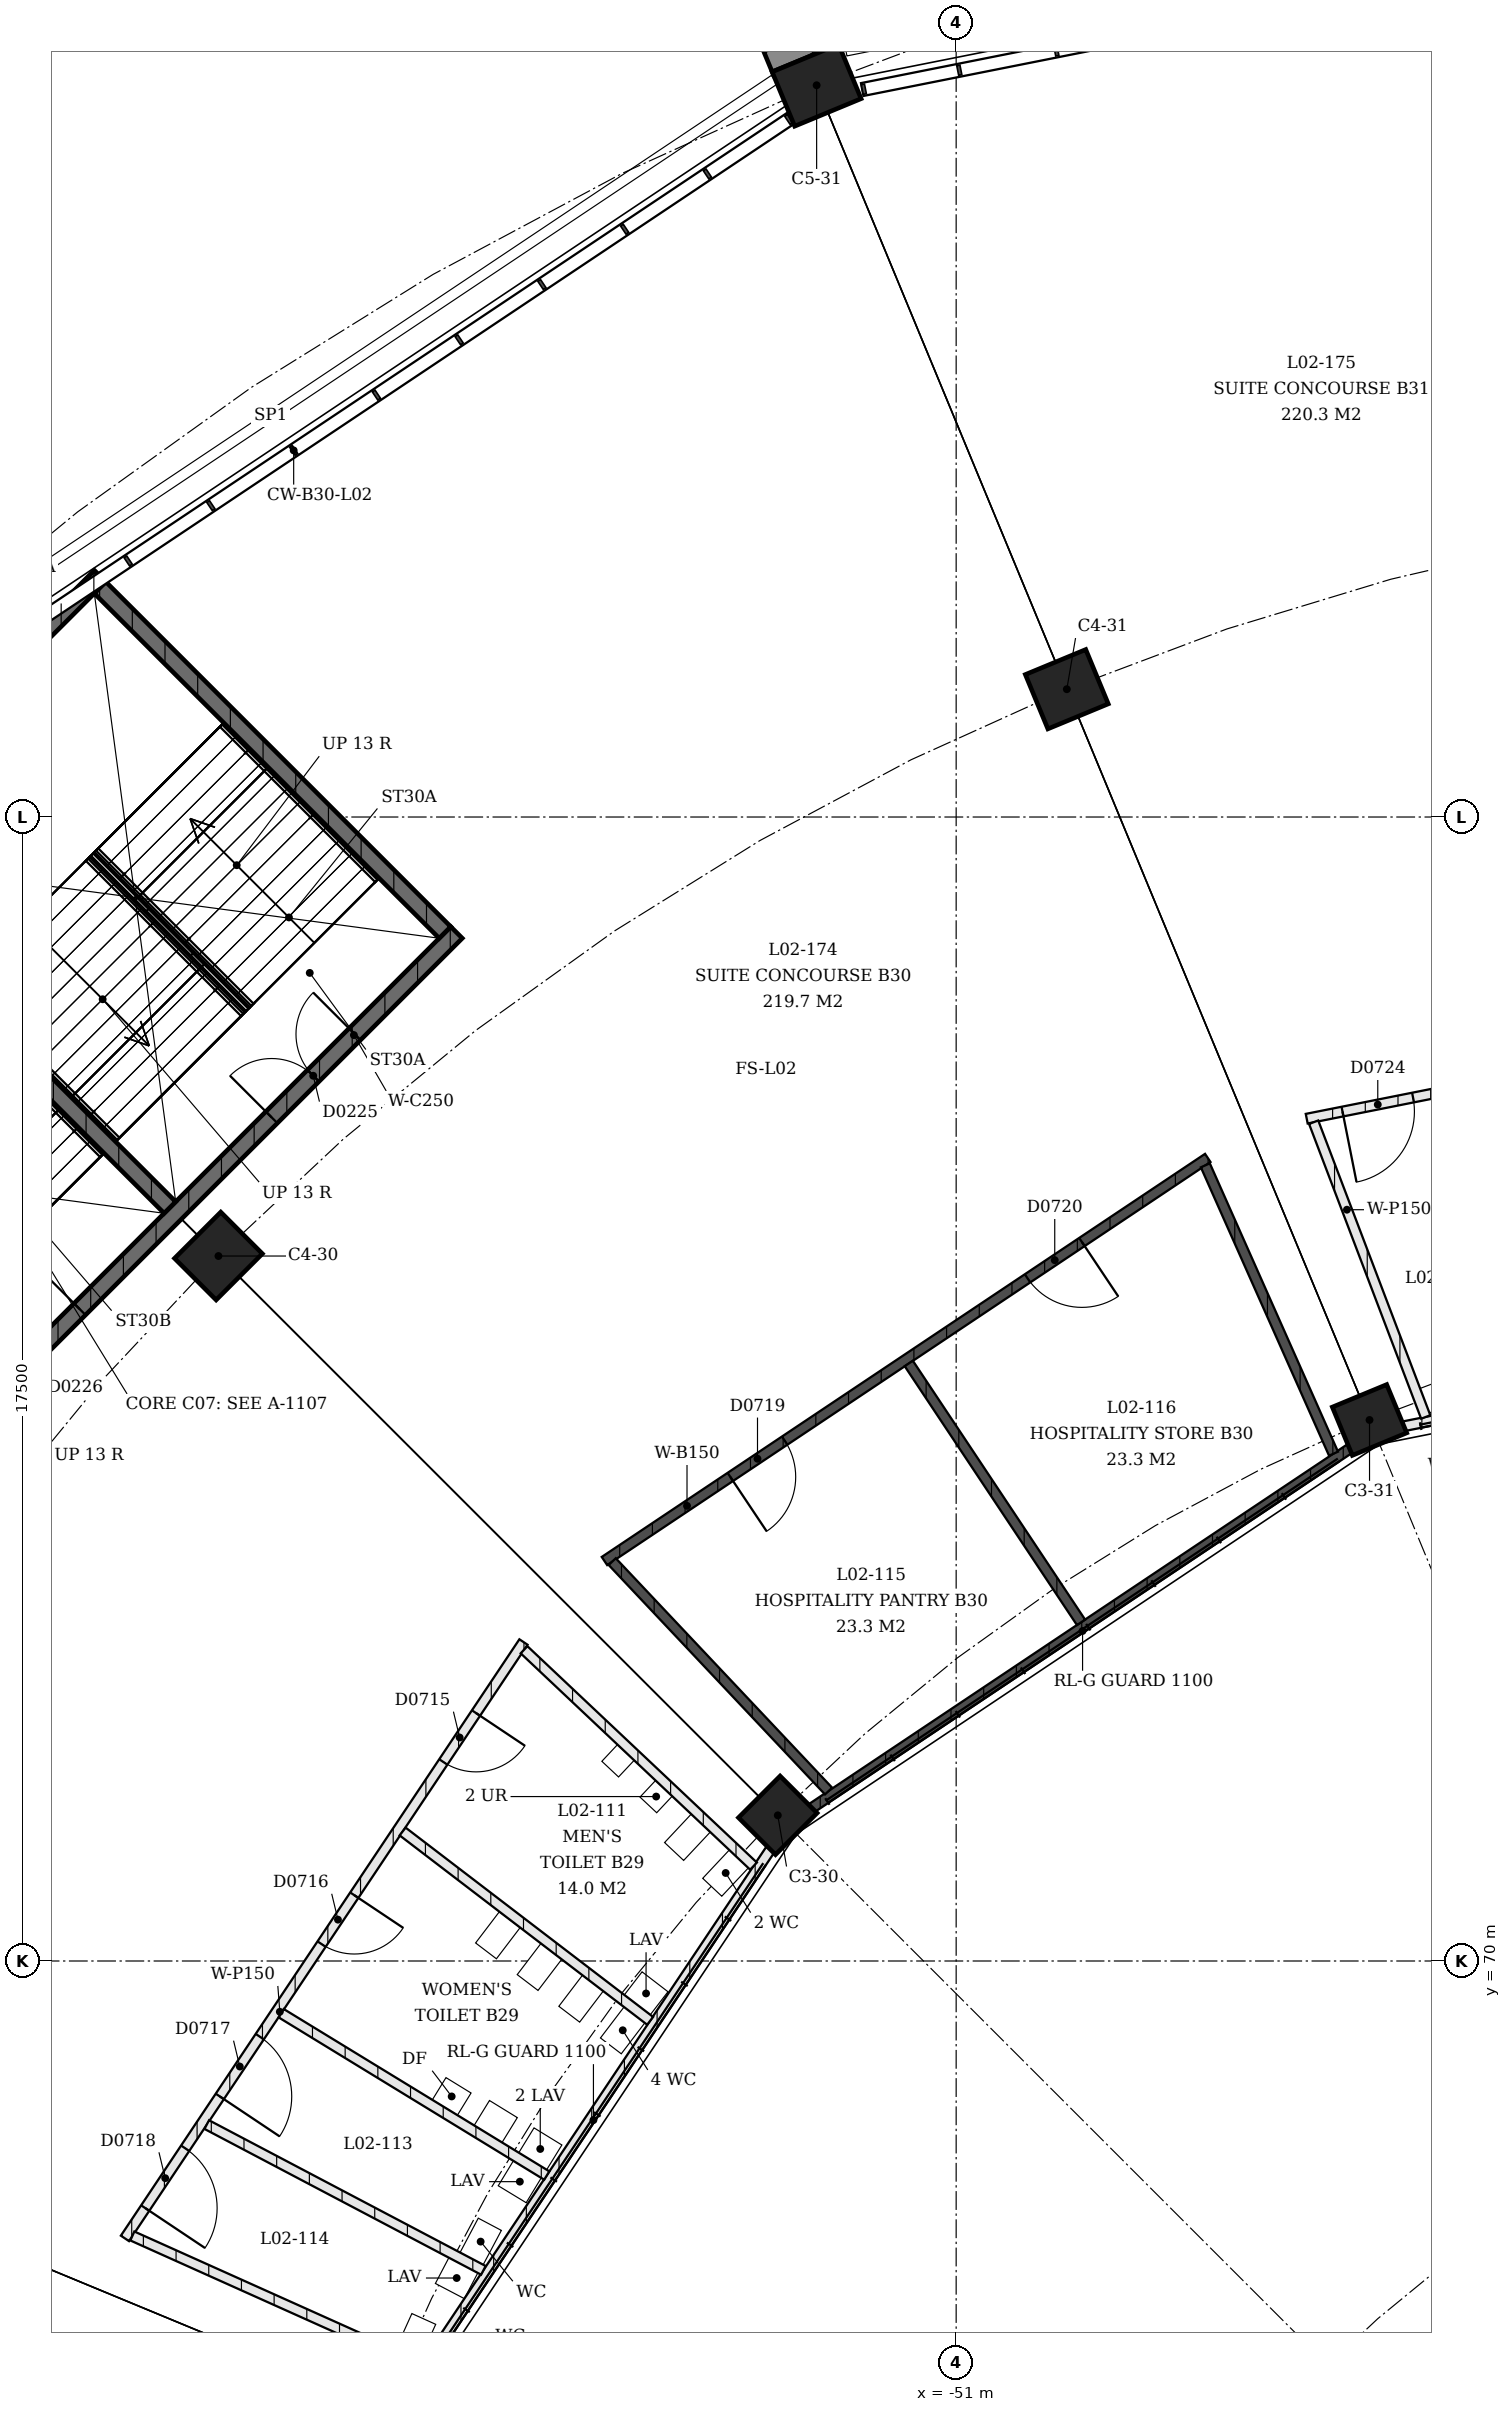
"""IFC4 building model, lengths in metres.
Left out: names, types, materials, properties, quantities, classifications, styles, units other than length and angle.
Written with IfcOpenShell. Run it as: python <this file> out.ifc"""

import sys

from ifc_helpers import new_model, si_unit, direction, frame, frame_2d, origin, origin_2d, place, context, subcontext, project, spatial, rectangle, extrude, element, fill, save


model = new_model("IFC4")
c1 = context("Model", 3, precision=1e-05, world=origin(), true_north=direction((0.0, 1.0)))
c2 = subcontext(c1, "Body", "Model", "MODEL_VIEW")
j1 = project(units=[si_unit("LENGTHUNIT", "METRE"), si_unit("PLANEANGLEUNIT", "RADIAN")], contexts=[c1])
p1 = place(None, origin())
s1 = spatial("IfcSite", under=j1, at=p1, CompositionType="ELEMENT")
p2 = place(p1, origin())
s2 = spatial("IfcBuilding", under=s1, at=p2, CompositionType="ELEMENT")
p3 = place(p2, frame((0.0, 0.0, 9.0)))
s3 = spatial("IfcBuildingStorey", under=s2, at=p3, CompositionType="ELEMENT", Elevation=9.0)
p4 = place(p3, frame((-53.728, 72.228, 0.0), z_axis=(0.0, 0.0, 1.0), x_axis=(-0.707106781187, -0.707106781187, 0.0)))
e1 = element("IfcColumn", 1, at=p4, inside=s3, PredefinedType="COLUMN", context=c2, shape_type="SweptSolid", body=[
    extrude(rectangle(XDim=0.9, YDim=0.8, at=origin_2d()), origin(), (0.0, 0.0, 1.0), 4.5),
])
p5 = place(p3, frame((-62.284, 80.784, 0.0), z_axis=(0.0, 0.0, 1.0), x_axis=(-0.707106781187, -0.707106781187, 0.0)))
e2 = element("IfcColumn", 2, at=p5, inside=s3, PredefinedType="COLUMN", context=c2, shape_type="SweptSolid", body=[
    extrude(rectangle(XDim=1.0, YDim=0.9, at=origin_2d()), origin(), (0.0, 0.0, 1.0), 4.5),
])
p6 = place(p3, frame((-44.677, 78.276, 0.0), z_axis=(0.0, 0.0, 1.0), x_axis=(-0.923879532511, -0.382683432365, 0.0)))
e3 = element("IfcColumn", 3, at=p6, inside=s3, PredefinedType="COLUMN", context=c2, shape_type="SweptSolid", body=[
    extrude(rectangle(XDim=0.9, YDim=0.8, at=origin_2d()), origin(), (0.0, 0.0, 1.0), 4.5),
])
p7 = place(p3, frame((-49.307, 89.455, 0.0), z_axis=(0.0, 0.0, 1.0), x_axis=(-0.923879532511, -0.382683432365, 0.0)))
e4 = element("IfcColumn", 4, at=p7, inside=s3, PredefinedType="COLUMN", context=c2, shape_type="SweptSolid", body=[
    extrude(rectangle(XDim=1.0, YDim=0.9, at=origin_2d()), origin(), (0.0, 0.0, 1.0), 4.5),
])
p8 = place(p3, frame((-53.134, 98.694, 0.0), z_axis=(0.0, 0.0, 1.0), x_axis=(-0.923879532511, -0.382683432365, 0.0)))
e5 = element("IfcColumn", 5, at=p8, inside=s3, PredefinedType="COLUMN", context=c2, shape_type="SweptSolid", body=[
    extrude(rectangle(XDim=1.1, YDim=0.9, at=origin_2d()), origin(), (0.0, 0.0, 1.0), 4.5),
])
p9 = place(p3, frame((-58.643, 85.734, 0.0), z_axis=(0.0, 0.0, 1.0), x_axis=(-0.707106781187, -0.707106781187, 0.0)))
e6 = element("IfcWall", 6, at=p9, inside=s3, PredefinedType="SHEAR", context=c2, shape_type="SweptSolid", body=[
    extrude(rectangle(XDim=12.15, YDim=0.25, at=frame_2d((6.075, 0.0))), origin(), (0.0, 0.0, 1.0), 4.09),
])
p10 = place(p9, frame((2.2, 0.0, 0.0)))
e7 = element("IfcOpeningElement", 7, at=p10, cuts=e6, PredefinedType="OPENING", context=c2, shape_type="SweptSolid", body=[
    extrude(rectangle(XDim=1.8, YDim=2.1, at=frame_2d((0.9, 1.05))), frame((0.0, 0.125, 0.0), z_axis=(0.0, -1.0, 0.0), x_axis=(1.0, 0.0, 0.0)), (0.0, 0.0, 1.0), 0.25),
])
p11 = place(p9, frame((8.15, 0.0, 0.0)))
e8 = element("IfcOpeningElement", 8, at=p11, cuts=e6, PredefinedType="OPENING", context=c2, shape_type="SweptSolid", body=[
    extrude(rectangle(XDim=1.8, YDim=2.1, at=frame_2d((0.9, 1.05))), frame((0.0, 0.125, 0.0), z_axis=(0.0, -1.0, 0.0), x_axis=(1.0, 0.0, 0.0)), (0.0, 0.0, 1.0), 0.25),
])
p12 = place(p3, frame((-64.094, 91.186, 0.0), z_axis=(0.0, 0.0, 1.0), x_axis=(-0.707106781187, -0.707106781187, 0.0)))
e9 = element("IfcWall", 9, at=p12, inside=s3, PredefinedType="SHEAR", context=c2, shape_type="SweptSolid", body=[
    extrude(rectangle(XDim=12.15, YDim=0.25, at=frame_2d((6.075, 0.0))), origin(), (0.0, 0.0, 1.0), 4.09),
])
p13 = place(p3, frame((-58.819, 85.734, 0.0), z_axis=(0.0, 0.0, 1.0), x_axis=(-0.707123144286, 0.707090417709, 0.0)))
e10 = element("IfcWall", 10, at=p13, inside=s3, PredefinedType="SHEAR", context=c2, shape_type="SweptSolid", body=[
    extrude(rectangle(XDim=7.46, YDim=0.25, at=frame_2d((3.73, 0.0))), origin(), (0.0, 0.0, 1.0), 4.09),
])
p14 = place(p3, frame((-63.027, 81.527, 0.0), z_axis=(0.0, 0.0, 1.0), x_axis=(-0.707106781187, 0.707106781187, 0.0)))
e11 = element("IfcWall", 11, at=p14, inside=s3, PredefinedType="SHEAR", context=c2, shape_type="SweptSolid", body=[
    extrude(rectangle(XDim=7.46, YDim=0.25, at=frame_2d((3.73, 0.0))), origin(), (0.0, 0.0, 1.0), 4.09),
])
p15 = place(p3, frame((-53.842, 71.705, 0.0), z_axis=(0.0, 0.0, 1.0), x_axis=(-0.555582843463, -0.831461186136, 0.0)))
e12 = element("IfcWall", 12, at=p15, inside=s3, PredefinedType="PARTITIONING", context=c2, shape_type="SweptSolid", body=[
    extrude(rectangle(XDim=9.89, YDim=0.15, at=frame_2d((4.945, 0.0))), origin(), (0.0, 0.0, 1.0), 3.0),
])
p16 = place(p3, frame((-57.619, 74.88, 0.0), z_axis=(0.0, 0.0, 1.0), x_axis=(-0.555577934543, -0.831464466258, 0.0)))
e13 = element("IfcWall", 13, at=p16, inside=s3, PredefinedType="PARTITIONING", context=c2, shape_type="SweptSolid", body=[
    extrude(rectangle(XDim=10.972, YDim=0.15, at=frame_2d((5.486, 0.0))), origin(), (0.0, 0.0, 1.0), 3.0),
])
p17 = place(p16, frame((1.307, 0.0, 0.0)))
e14 = element("IfcOpeningElement", 14, at=p17, cuts=e13, PredefinedType="OPENING", context=c2, shape_type="SweptSolid", body=[
    extrude(rectangle(XDim=0.9, YDim=2.1, at=frame_2d((0.45, 1.05))), frame((0.0, 0.075, 0.0), z_axis=(0.0, -1.0, 0.0), x_axis=(1.0, 0.0, 0.0)), (0.0, 0.0, 1.0), 0.15),
])
p18 = place(p16, frame((4.658, 0.0, 0.0)))
e15 = element("IfcOpeningElement", 15, at=p18, cuts=e13, PredefinedType="OPENING", context=c2, shape_type="SweptSolid", body=[
    extrude(rectangle(XDim=0.9, YDim=2.1, at=frame_2d((0.45, 1.05))), frame((0.0, 0.075, 0.0), z_axis=(0.0, -1.0, 0.0), x_axis=(1.0, 0.0, 0.0)), (0.0, 0.0, 1.0), 0.15),
])
p19 = place(p16, frame((7.26, 0.0, 0.0)))
e16 = element("IfcOpeningElement", 16, at=p19, cuts=e13, PredefinedType="OPENING", context=c2, shape_type="SweptSolid", body=[
    extrude(rectangle(XDim=1.1, YDim=2.1, at=frame_2d((0.55, 1.05))), frame((0.0, 0.075, 0.0), z_axis=(0.0, -1.0, 0.0), x_axis=(1.0, 0.0, 0.0)), (0.0, 0.0, 1.0), 0.15),
])
p20 = place(p16, frame((9.314, 0.0, 0.0)))
e17 = element("IfcOpeningElement", 17, at=p20, cuts=e13, PredefinedType="OPENING", context=c2, shape_type="SweptSolid", body=[
    extrude(rectangle(XDim=1.1, YDim=2.1, at=frame_2d((0.55, 1.05))), frame((0.0, 0.075, 0.0), z_axis=(0.0, -1.0, 0.0), x_axis=(1.0, 0.0, 0.0)), (0.0, 0.0, 1.0), 0.15),
])
p21 = place(p3, frame((-54.1, 71.452, 0.0), z_axis=(0.0, 0.0, 1.0), x_axis=(-0.727577136184, 0.686025882093, 0.0)))
e18 = element("IfcWall", 18, at=p21, inside=s3, PredefinedType="PARTITIONING", context=c2, shape_type="SweptSolid", body=[
    extrude(rectangle(XDim=4.824, YDim=0.15, at=frame_2d((2.412, 0.0))), origin(), (0.0, 0.0, 1.0), 3.0),
])
p22 = place(p3, frame((-55.681, 69.085, 0.0), z_axis=(0.0, 0.0, 1.0), x_axis=(-0.794266232117, 0.607569874597, 0.0)))
e19 = element("IfcWall", 19, at=p22, inside=s3, PredefinedType="PARTITIONING", context=c2, shape_type="SweptSolid", body=[
    extrude(rectangle(XDim=4.767, YDim=0.15, at=frame_2d((2.383, 0.0))), origin(), (0.0, 0.0, 1.0), 3.0),
])
p23 = place(p3, frame((-57.262, 66.718, 0.0), z_axis=(0.0, 0.0, 1.0), x_axis=(-0.8532285882, 0.52153712838, 0.0)))
e20 = element("IfcWall", 20, at=p23, inside=s3, PredefinedType="PARTITIONING", context=c2, shape_type="SweptSolid", body=[
    extrude(rectangle(XDim=4.761, YDim=0.15, at=frame_2d((2.38, 0.0))), origin(), (0.0, 0.0, 1.0), 3.0),
])
p24 = place(p3, frame((-58.232, 65.268, 0.0), z_axis=(0.0, 0.0, 1.0), x_axis=(-0.884698876091, 0.466162952886, 0.0)))
e21 = element("IfcWall", 21, at=p24, inside=s3, PredefinedType="PARTITIONING", context=c2, shape_type="SweptSolid", body=[
    extrude(rectangle(XDim=4.783, YDim=0.15, at=frame_2d((2.391, 0.0))), origin(), (0.0, 0.0, 1.0), 3.0),
])
p25 = place(p3, frame((-59.201, 63.817, 0.0), z_axis=(0.0, 0.0, 1.0), x_axis=(-0.912239426779, 0.409657452305, 0.0)))
e22 = element("IfcWall", 22, at=p25, inside=s3, PredefinedType="PARTITIONING", context=c2, shape_type="SweptSolid", body=[
    extrude(rectangle(XDim=4.824, YDim=0.15, at=frame_2d((2.412, 0.0))), origin(), (0.0, 0.0, 1.0), 3.0),
])
p26 = place(p3, frame((-53.205, 72.342, 0.0), z_axis=(0.0, 0.0, 1.0), x_axis=(0.831461186136, 0.555582843463, 0.0)))
e23 = element("IfcWall", 23, at=p26, inside=s3, PredefinedType="SOLIDWALL", context=c2, shape_type="SweptSolid", body=[
    extrude(rectangle(XDim=9.89, YDim=0.15, at=frame_2d((4.945, 0.0))), origin(), (0.0, 0.0, 1.0), 3.0),
])
p27 = place(p3, frame((-56.38, 76.119, 0.0), z_axis=(0.0, 0.0, 1.0), x_axis=(0.831471162003, 0.555567913722, 0.0)))
e24 = element("IfcWall", 24, at=p27, inside=s3, PredefinedType="SOLIDWALL", context=c2, shape_type="SweptSolid", body=[
    extrude(rectangle(XDim=11.099, YDim=0.15, at=frame_2d((5.55, 0.0))), origin(), (0.0, 0.0, 1.0), 3.0),
])
p28 = place(p27, frame((2.315, 0.0, 0.0)))
e25 = element("IfcOpeningElement", 25, at=p28, cuts=e24, PredefinedType="OPENING", context=c2, shape_type="SweptSolid", body=[
    extrude(rectangle(XDim=1.0, YDim=2.1, at=frame_2d((0.5, 1.05))), frame((0.0, 0.075, 0.0), z_axis=(0.0, -1.0, 0.0), x_axis=(1.0, 0.0, 0.0)), (0.0, 0.0, 1.0), 0.15),
])
p29 = place(p27, frame((7.784, 0.0, 0.0)))
e26 = element("IfcOpeningElement", 26, at=p29, cuts=e24, PredefinedType="OPENING", context=c2, shape_type="SweptSolid", body=[
    extrude(rectangle(XDim=1.0, YDim=2.1, at=frame_2d((0.5, 1.05))), frame((0.0, 0.075, 0.0), z_axis=(0.0, -1.0, 0.0), x_axis=(1.0, 0.0, 0.0)), (0.0, 0.0, 1.0), 0.15),
])
p30 = place(p3, frame((-52.952, 72.6, 0.0), z_axis=(0.0, 0.0, 1.0), x_axis=(-0.686025882093, 0.727577136184, 0.0)))
e27 = element("IfcWall", 27, at=p30, inside=s3, PredefinedType="SOLIDWALL", context=c2, shape_type="SweptSolid", body=[
    extrude(rectangle(XDim=4.824, YDim=0.15, at=frame_2d((2.412, 0.0))), origin(), (0.0, 0.0, 1.0), 3.0),
])
p31 = place(p3, frame((-49.09, 75.18, 0.0), z_axis=(0.0, 0.0, 1.0), x_axis=(-0.553930112441, 0.832563169093, 0.0)))
e28 = element("IfcWall", 28, at=p31, inside=s3, PredefinedType="SOLIDWALL", context=c2, shape_type="SweptSolid", body=[
    extrude(rectangle(XDim=4.757, YDim=0.15, at=frame_2d((2.378, 0.0))), origin(), (0.0, 0.0, 1.0), 3.0),
])
p32 = place(p3, frame((-45.228, 77.761, 0.0), z_axis=(0.0, 0.0, 1.0), x_axis=(-0.406147851791, 0.913807377124, 0.0)))
e29 = element("IfcWall", 29, at=p32, inside=s3, PredefinedType="SOLIDWALL", context=c2, shape_type="SweptSolid", body=[
    extrude(rectangle(XDim=4.827, YDim=0.15, at=frame_2d((2.414, 0.0))), origin(), (0.0, 0.0, 1.0), 3.0),
])
p33 = place(p3, frame((-34.5, 80.101, 0.0), z_axis=(0.0, 0.0, 1.0), x_axis=(-0.980783419557, -0.195099676887, 0.0)))
e30 = element("IfcWall", 30, at=p33, inside=s3, PredefinedType="PARTITIONING", context=c2, shape_type="SweptSolid", body=[
    extrude(rectangle(XDim=9.839, YDim=0.15, at=frame_2d((4.92, 0.0))), origin(), (0.0, 0.0, 1.0), 3.0),
])
p34 = place(p3, frame((-34.876, 85.026, 0.0), z_axis=(0.0, 0.0, 1.0), x_axis=(-0.980788934186, -0.195071952313, 0.0)))
e31 = element("IfcWall", 31, at=p34, inside=s3, PredefinedType="PARTITIONING", context=c2, shape_type="SweptSolid", body=[
    extrude(rectangle(XDim=10.972, YDim=0.15, at=frame_2d((5.486, 0.0))), origin(), (0.0, 0.0, 1.0), 3.0),
])
p35 = place(p34, frame((1.307, 0.0, 0.0)))
e32 = element("IfcOpeningElement", 32, at=p35, cuts=e31, PredefinedType="OPENING", context=c2, shape_type="SweptSolid", body=[
    extrude(rectangle(XDim=0.9, YDim=2.1, at=frame_2d((0.45, 1.05))), frame((0.0, 0.075, 0.0), z_axis=(0.0, -1.0, 0.0), x_axis=(1.0, 0.0, 0.0)), (0.0, 0.0, 1.0), 0.15),
])
p36 = place(p34, frame((4.658, 0.0, 0.0)))
e33 = element("IfcOpeningElement", 33, at=p36, cuts=e31, PredefinedType="OPENING", context=c2, shape_type="SweptSolid", body=[
    extrude(rectangle(XDim=0.9, YDim=2.1, at=frame_2d((0.45, 1.05))), frame((0.0, 0.075, 0.0), z_axis=(0.0, -1.0, 0.0), x_axis=(1.0, 0.0, 0.0)), (0.0, 0.0, 1.0), 0.15),
])
p37 = place(p34, frame((7.26, 0.0, 0.0)))
e34 = element("IfcOpeningElement", 34, at=p37, cuts=e31, PredefinedType="OPENING", context=c2, shape_type="SweptSolid", body=[
    extrude(rectangle(XDim=1.1, YDim=2.1, at=frame_2d((0.55, 1.05))), frame((0.0, 0.075, 0.0), z_axis=(0.0, -1.0, 0.0), x_axis=(1.0, 0.0, 0.0)), (0.0, 0.0, 1.0), 0.15),
])
p38 = place(p34, frame((9.314, 0.0, 0.0)))
e35 = element("IfcOpeningElement", 35, at=p38, cuts=e31, PredefinedType="OPENING", context=c2, shape_type="SweptSolid", body=[
    extrude(rectangle(XDim=1.1, YDim=2.1, at=frame_2d((0.55, 1.05))), frame((0.0, 0.075, 0.0), z_axis=(0.0, -1.0, 0.0), x_axis=(1.0, 0.0, 0.0)), (0.0, 0.0, 1.0), 0.15),
])
p39 = place(p3, frame((-43.817, 78.322, 0.0), z_axis=(0.0, 0.0, 1.0), x_axis=(-0.35538492255, 0.934720041951, 0.0)))
e36 = element("IfcWall", 36, at=p39, inside=s3, PredefinedType="PARTITIONING", context=c2, shape_type="SweptSolid", body=[
    extrude(rectangle(XDim=4.824, YDim=0.15, at=frame_2d((2.412, 0.0))), origin(), (0.0, 0.0, 1.0), 3.0),
])
p40 = place(p10, origin())
e37 = element("IfcDoor", 37, at=p40, inside=s3, OperationType="DOUBLE_DOOR_SINGLE_SWING", PredefinedType="DOOR", context=c2, shape_type="SweptSolid", body=[
    extrude(rectangle(XDim=1.8, YDim=2.1, at=frame_2d((0.9, 1.05))), frame((0.0, 0.025, 0.0), z_axis=(0.0, -1.0, 0.0), x_axis=(1.0, 0.0, 0.0)), (0.0, 0.0, 1.0), 0.05),
])
fill(e7, e37)
p41 = place(p11, origin())
e38 = element("IfcDoor", 38, at=p41, inside=s3, OperationType="DOUBLE_DOOR_SINGLE_SWING", PredefinedType="DOOR", context=c2, shape_type="SweptSolid", body=[
    extrude(rectangle(XDim=1.8, YDim=2.1, at=frame_2d((0.9, 1.05))), frame((0.0, 0.025, 0.0), z_axis=(0.0, -1.0, 0.0), x_axis=(1.0, 0.0, 0.0)), (0.0, 0.0, 1.0), 0.05),
])
fill(e8, e38)
p42 = place(p17, origin())
e39 = element("IfcDoor", 39, at=p42, inside=s3, OperationType="SINGLE_SWING_RIGHT", PredefinedType="DOOR", context=c2, shape_type="SweptSolid", body=[
    extrude(rectangle(XDim=0.9, YDim=2.1, at=frame_2d((0.45, 1.05))), frame((0.0, 0.025, 0.0), z_axis=(0.0, -1.0, 0.0), x_axis=(1.0, 0.0, 0.0)), (0.0, 0.0, 1.0), 0.05),
])
fill(e14, e39)
p43 = place(p18, origin())
e40 = element("IfcDoor", 40, at=p43, inside=s3, OperationType="SINGLE_SWING_RIGHT", PredefinedType="DOOR", context=c2, shape_type="SweptSolid", body=[
    extrude(rectangle(XDim=0.9, YDim=2.1, at=frame_2d((0.45, 1.05))), frame((0.0, 0.025, 0.0), z_axis=(0.0, -1.0, 0.0), x_axis=(1.0, 0.0, 0.0)), (0.0, 0.0, 1.0), 0.05),
])
fill(e15, e40)
p44 = place(p19, origin())
e41 = element("IfcDoor", 41, at=p44, inside=s3, OperationType="SINGLE_SWING_LEFT", PredefinedType="DOOR", context=c2, shape_type="SweptSolid", body=[
    extrude(rectangle(XDim=1.1, YDim=2.1, at=frame_2d((0.55, 1.05))), frame((0.0, 0.025, 0.0), z_axis=(0.0, -1.0, 0.0), x_axis=(1.0, 0.0, 0.0)), (0.0, 0.0, 1.0), 0.05),
])
fill(e16, e41)
p45 = place(p20, origin())
e42 = element("IfcDoor", 42, at=p45, inside=s3, OperationType="SINGLE_SWING_LEFT", PredefinedType="DOOR", context=c2, shape_type="SweptSolid", body=[
    extrude(rectangle(XDim=1.1, YDim=2.1, at=frame_2d((0.55, 1.05))), frame((0.0, 0.025, 0.0), z_axis=(0.0, -1.0, 0.0), x_axis=(1.0, 0.0, 0.0)), (0.0, 0.0, 1.0), 0.05),
])
fill(e17, e42)
p46 = place(p28, origin())
e43 = element("IfcDoor", 43, at=p46, inside=s3, OperationType="SINGLE_SWING_LEFT", PredefinedType="DOOR", context=c2, shape_type="SweptSolid", body=[
    extrude(rectangle(XDim=1.0, YDim=2.1, at=frame_2d((0.5, 1.05))), frame((0.0, 0.025, 0.0), z_axis=(0.0, -1.0, 0.0), x_axis=(1.0, 0.0, 0.0)), (0.0, 0.0, 1.0), 0.05),
])
fill(e25, e43)
p47 = place(p29, origin())
e44 = element("IfcDoor", 44, at=p47, inside=s3, OperationType="SINGLE_SWING_RIGHT", PredefinedType="DOOR", context=c2, shape_type="SweptSolid", body=[
    extrude(rectangle(XDim=1.0, YDim=2.1, at=frame_2d((0.5, 1.05))), frame((0.0, 0.025, 0.0), z_axis=(0.0, -1.0, 0.0), x_axis=(1.0, 0.0, 0.0)), (0.0, 0.0, 1.0), 0.05),
])
fill(e26, e44)
p48 = place(p38, origin())
e45 = element("IfcDoor", 45, at=p48, inside=s3, OperationType="SINGLE_SWING_LEFT", PredefinedType="DOOR", context=c2, shape_type="SweptSolid", body=[
    extrude(rectangle(XDim=1.1, YDim=2.1, at=frame_2d((0.55, 1.05))), frame((0.0, 0.025, 0.0), z_axis=(0.0, -1.0, 0.0), x_axis=(1.0, 0.0, 0.0)), (0.0, 0.0, 1.0), 0.05),
])
fill(e35, e45)
save(model, sys.argv[1])
